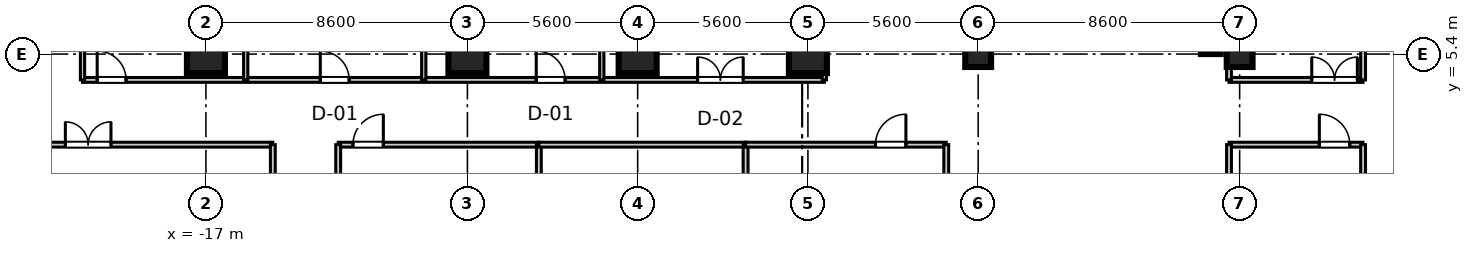
"""IFC4 building model, lengths in metres.
Left out: names, types, materials, properties, quantities, classifications, styles, units other than length and angle.
Written with IfcOpenShell. Run it as: python <this file> out.ifc"""

import sys

from ifc_helpers import new_model, si_unit, direction, frame, frame_2d, origin, origin_2d, place, context, subcontext, project, spatial, rectangle, extrude, source, transform, mapped, element, fill, save


model = new_model("IFC4")
c1 = context("Model", 3, precision=1e-05, world=origin(), true_north=direction((0.0, 1.0)))
c2 = subcontext(c1, "Body", "Model", "MODEL_VIEW")
j1 = project(units=[si_unit("LENGTHUNIT", "METRE"), si_unit("PLANEANGLEUNIT", "RADIAN")], contexts=[c1])
p1 = place(None, origin())
s1 = spatial("IfcSite", under=j1, at=p1, CompositionType="ELEMENT")
p2 = place(p1, origin())
s2 = spatial("IfcBuilding", under=s1, at=p2, CompositionType="ELEMENT")
p3 = place(p2, frame((0.0, 0.0, 88.3)))
s3 = spatial("IfcBuildingStorey", under=s2, at=p3, CompositionType="ELEMENT", Elevation=88.3)
m1 = source(origin(), c2, "Body", "SweptSolid", [
    extrude(rectangle(XDim=1.25, YDim=1.25, at=origin_2d()), origin(), (0.0, 0.0, 1.0), 3.605),
])
for number, where, z_axis, x_axis in (
    (1, (-17.0, 5.4, 0.0), (0.0, 0.0, 1.0), (1.0, 0.0, 0.0)),
    (2, (-8.4, 5.4, 0.0), (0.0, 0.0, 1.0), (1.0, 0.0, 0.0)),
    (3, (-2.8, 5.4, 0.0), (0.0, 0.0, 1.0), (1.0, 0.0, 0.0)),
    (4, (2.8, 5.4, 0.0), (0.0, 0.0, 1.0), (1.0, 0.0, 0.0)),
):
    element("IfcColumn", number, at=place(p3, frame(where, z_axis=z_axis, x_axis=x_axis)), inside=s3, PredefinedType="COLUMN", context=c2, shape_type="MappedRepresentation", body=[
        mapped(m1, transform((0.0, 0.0, 0.0), scale=1.0)),
    ])
m2 = source(origin(), c2, "Body", "SweptSolid", [
    extrude(rectangle(XDim=0.85, YDim=0.85, at=origin_2d()), origin(), (0.0, 0.0, 1.0), 3.605),
])
for number, where, z_axis, x_axis in (
    (5, (8.4, 5.4, 0.0), (0.0, 0.0, 1.0), (1.0, 0.0, 0.0)),
    (6, (17.0, 5.4, 0.0), (0.0, 0.0, 1.0), (1.0, 0.0, 0.0)),
):
    element("IfcColumn", number, at=place(p3, frame(where, z_axis=z_axis, x_axis=x_axis)), inside=s3, PredefinedType="PILASTER", context=c2, shape_type="MappedRepresentation", body=[
        mapped(m2, transform((0.0, 0.0, 0.0), scale=1.0)),
    ])
m3 = source(origin(), c2, "Body", "SweptSolid", [
    extrude(rectangle(XDim=11.6, YDim=0.65, at=frame_2d((5.8, 0.0))), origin(), (0.0, 0.0, 1.0), 3.38),
])
p4 = place(p3, frame((16.05, 5.4, 0.0), z_axis=(0.0, 0.0, 1.0), x_axis=(0.0, 1.0, 0.0)))
e7 = element("IfcWall", 7, at=p4, inside=s3, PredefinedType="SHEAR", context=c2, shape_type="MappedRepresentation", body=[
    mapped(m3, transform((0.0, 0.0, 0.0), scale=1.0)),
])
m4 = source(origin(), c2, "Body", "SweptSolid", [
    extrude(rectangle(XDim=4.41, YDim=0.16, at=frame_2d((2.205, 0.0))), origin(), (0.0, 0.0, 1.0), 2.72),
])
p5 = place(p3, frame((16.65, 4.55, 0.0), z_axis=(0.0, 0.0, 1.0), x_axis=(1.0, 0.0, 0.0)))
e8 = element("IfcWall", 8, at=p5, inside=s3, PredefinedType="PARTITIONING", context=c2, shape_type="MappedRepresentation", body=[
    mapped(m4, transform((0.0, 0.0, 0.0), scale=1.0)),
])
p6 = place(p5, frame((2.722, 0.0, 0.0)))
e9 = element("IfcOpeningElement", 9, at=p6, cuts=e8, PredefinedType="OPENING", context=c2, shape_type="SweptSolid", body=[
    extrude(rectangle(XDim=1.5, YDim=2.15, at=frame_2d((0.75, 1.075))), frame((0.0, 0.09, 0.0), z_axis=(0.0, -1.0, 0.0), x_axis=(1.0, 0.0, 0.0)), (0.0, 0.0, 1.0), 0.18),
])
m5 = source(origin(), c2, "Body", "SweptSolid", [
    extrude(rectangle(XDim=19.25, YDim=0.16, at=frame_2d((9.625, 0.0))), origin(), (0.0, 0.0, 1.0), 2.72),
])
p7 = place(p3, frame((16.65, 4.55, 0.0), z_axis=(0.0, 0.0, 1.0), x_axis=(0.0, 1.0, 0.0)))
e10 = element("IfcWall", 10, at=p7, inside=s3, PredefinedType="PARTITIONING", context=c2, shape_type="MappedRepresentation", body=[
    mapped(m5, transform((0.0, 0.0, 0.0), scale=1.0)),
])
m6 = source(origin(), c2, "Body", "SweptSolid", [
    extrude(rectangle(XDim=17.83, YDim=0.16, at=frame_2d((8.915, 0.0))), origin(), (0.0, 0.0, 1.0), 2.72),
])
p8 = place(p3, frame((21.06, 4.55, 0.0), z_axis=(0.0, 0.0, 1.0), x_axis=(0.0, 1.0, 0.0)))
e11 = element("IfcWall", 11, at=p8, inside=s3, PredefinedType="PARTITIONING", context=c2, shape_type="MappedRepresentation", body=[
    mapped(m6, transform((0.0, 0.0, 0.0), scale=1.0)),
])
m7 = source(origin(), c2, "Body", "SweptSolid", [
    extrude(rectangle(XDim=24.4, YDim=0.16, at=frame_2d((12.2, 0.0))), origin(), (0.0, 0.0, 1.0), 2.72),
])
p9 = place(p3, frame((-21.06, 4.55, 0.0), z_axis=(0.0, 0.0, 1.0), x_axis=(1.0, 0.0, 0.0)))
e12 = element("IfcWall", 12, at=p9, inside=s3, PredefinedType="PARTITIONING", context=c2, shape_type="MappedRepresentation", body=[
    mapped(m7, transform((0.0, 0.0, 0.0), scale=1.0)),
])
p10 = place(p9, frame((0.483, 0.0, 0.0)))
e13 = element("IfcOpeningElement", 13, at=p10, cuts=e12, PredefinedType="OPENING", context=c2, shape_type="SweptSolid", body=[
    extrude(rectangle(XDim=0.95, YDim=2.1, at=frame_2d((0.475, 1.05))), frame((0.0, 0.09, 0.0), z_axis=(0.0, -1.0, 0.0), x_axis=(1.0, 0.0, 0.0)), (0.0, 0.0, 1.0), 0.18),
])
p11 = place(p9, frame((7.821, 0.0, 0.0)))
e14 = element("IfcOpeningElement", 14, at=p11, cuts=e12, PredefinedType="OPENING", context=c2, shape_type="SweptSolid", body=[
    extrude(rectangle(XDim=0.95, YDim=2.1, at=frame_2d((0.475, 1.05))), frame((0.0, 0.09, 0.0), z_axis=(0.0, -1.0, 0.0), x_axis=(1.0, 0.0, 0.0)), (0.0, 0.0, 1.0), 0.18),
])
p12 = place(p9, frame((14.924, 0.0, 0.0)))
e15 = element("IfcOpeningElement", 15, at=p12, cuts=e12, PredefinedType="OPENING", context=c2, shape_type="SweptSolid", body=[
    extrude(rectangle(XDim=0.95, YDim=2.1, at=frame_2d((0.475, 1.05))), frame((0.0, 0.09, 0.0), z_axis=(0.0, -1.0, 0.0), x_axis=(1.0, 0.0, 0.0)), (0.0, 0.0, 1.0), 0.18),
])
p13 = place(p9, frame((20.232, 0.0, 0.0)))
e16 = element("IfcOpeningElement", 16, at=p13, cuts=e12, PredefinedType="OPENING", context=c2, shape_type="SweptSolid", body=[
    extrude(rectangle(XDim=1.5, YDim=2.15, at=frame_2d((0.75, 1.075))), frame((0.0, 0.09, 0.0), z_axis=(0.0, -1.0, 0.0), x_axis=(1.0, 0.0, 0.0)), (0.0, 0.0, 1.0), 0.18),
])
m8 = source(origin(), c2, "Body", "SweptSolid", [
    extrude(rectangle(XDim=17.83, YDim=0.14, at=frame_2d((8.915, 0.0))), origin(), (0.0, 0.0, 1.0), 2.72),
])
p14 = place(p3, frame((-21.06, 4.55, 0.0), z_axis=(0.0, 0.0, 1.0), x_axis=(0.0, 1.0, 0.0)))
e17 = element("IfcWall", 17, at=p14, inside=s3, PredefinedType="PARTITIONING", context=c2, shape_type="MappedRepresentation", body=[
    mapped(m8, transform((0.0, 0.0, 0.0), scale=1.0)),
])
m9 = source(origin(), c2, "Body", "SweptSolid", [
    extrude(rectangle(XDim=19.25, YDim=0.14, at=frame_2d((9.625, 0.0))), origin(), (0.0, 0.0, 1.0), 2.72),
])
for number, where, z_axis, x_axis in (
    (18, (3.34, 4.55, 0.0), (0.0, 0.0, 1.0), (0.0, 1.0, 0.0)),
    (19, (-15.692, 4.55, 0.0), (0.0, 0.0, 1.0), (0.0, 1.0, 0.0)),
    (20, (-9.836, 4.55, 0.0), (0.0, 0.0, 1.0), (0.0, 1.0, 0.0)),
    (21, (-3.98, 4.55, 0.0), (0.0, 0.0, 1.0), (0.0, 1.0, 0.0)),
):
    element("IfcWall", number, at=place(p3, frame(where, z_axis=z_axis, x_axis=x_axis)), inside=s3, PredefinedType="PARTITIONING", context=c2, shape_type="MappedRepresentation", body=[
        mapped(m9, transform((0.0, 0.0, 0.0), scale=1.0)),
    ])
m10 = source(origin(), c2, "Body", "SweptSolid", [
    extrude(rectangle(XDim=9.0, YDim=0.16, at=frame_2d((4.5, 0.0))), origin(), (0.0, 0.0, 1.0), 2.72),
])
p15 = place(p3, frame((-23.8, 2.42, 0.0), z_axis=(0.0, 0.0, 1.0), x_axis=(1.0, 0.0, 0.0)))
e22 = element("IfcWall", 22, at=p15, inside=s3, PredefinedType="PARTITIONING", context=c2, shape_type="MappedRepresentation", body=[
    mapped(m10, transform((0.0, 0.0, 0.0), scale=1.0)),
])
p16 = place(p15, frame((2.176, 0.0, 0.0)))
e23 = element("IfcOpeningElement", 23, at=p16, cuts=e22, PredefinedType="OPENING", context=c2, shape_type="SweptSolid", body=[
    extrude(rectangle(XDim=1.5, YDim=2.15, at=frame_2d((0.75, 1.075))), frame((0.0, 0.09, 0.0), z_axis=(0.0, -1.0, 0.0), x_axis=(1.0, 0.0, 0.0)), (0.0, 0.0, 1.0), 0.18),
])
m11 = source(origin(), c2, "Body", "SweptSolid", [
    extrude(rectangle(XDim=4.84, YDim=0.16, at=frame_2d((2.42, 0.0))), origin(), (0.0, 0.0, 1.0), 2.72),
])
p17 = place(p3, frame((-14.8, -2.42, 0.0), z_axis=(0.0, 0.0, 1.0), x_axis=(0.0, 1.0, 0.0)))
e24 = element("IfcWall", 24, at=p17, inside=s3, PredefinedType="PARTITIONING", context=c2, shape_type="MappedRepresentation", body=[
    mapped(m11, transform((0.0, 0.0, 0.0), scale=1.0)),
])
m12 = source(origin(), c2, "Body", "SweptSolid", [
    extrude(rectangle(XDim=6.6, YDim=0.16, at=frame_2d((3.3, 0.0))), origin(), (0.0, 0.0, 1.0), 2.72),
])
p18 = place(p3, frame((-12.65, 2.42, 0.0), z_axis=(0.0, 0.0, 1.0), x_axis=(1.0, 0.0, 0.0)))
e25 = element("IfcWall", 25, at=p18, inside=s3, PredefinedType="PARTITIONING", context=c2, shape_type="MappedRepresentation", body=[
    mapped(m12, transform((0.0, 0.0, 0.0), scale=1.0)),
])
p19 = place(p18, frame((0.485, 0.0, 0.0)))
e26 = element("IfcOpeningElement", 26, at=p19, cuts=e25, PredefinedType="OPENING", context=c2, shape_type="SweptSolid", body=[
    extrude(rectangle(XDim=1.0, YDim=2.1, at=frame_2d((0.5, 1.05))), frame((0.0, 0.09, 0.0), z_axis=(0.0, -1.0, 0.0), x_axis=(1.0, 0.0, 0.0)), (0.0, 0.0, 1.0), 0.18),
])
for number, where, z_axis, x_axis in (
    (27, (-12.65, -2.42, 0.0), (0.0, 0.0, 1.0), (0.0, 1.0, 0.0)),
    (28, (-6.05, -2.42, 0.0), (0.0, 0.0, 1.0), (0.0, 1.0, 0.0)),
):
    element("IfcWall", number, at=place(p3, frame(where, z_axis=z_axis, x_axis=x_axis)), inside=s3, PredefinedType="PARTITIONING", context=c2, shape_type="MappedRepresentation", body=[
        mapped(m11, transform((0.0, 0.0, 0.0), scale=1.0)),
    ])
m13 = source(origin(), c2, "Body", "SweptSolid", [
    extrude(rectangle(XDim=6.8, YDim=0.16, at=frame_2d((3.4, 0.0))), origin(), (0.0, 0.0, 1.0), 2.72),
])
p20 = place(p3, frame((-6.05, 2.42, 0.0), z_axis=(0.0, 0.0, 1.0), x_axis=(1.0, 0.0, 0.0)))
e29 = element("IfcWall", 29, at=p20, inside=s3, PredefinedType="PARTITIONING", context=c2, shape_type="MappedRepresentation", body=[
    mapped(m13, transform((0.0, 0.0, 0.0), scale=1.0)),
])
p21 = place(p3, frame((0.75, -2.42, 0.0), z_axis=(0.0, 0.0, 1.0), x_axis=(0.0, 1.0, 0.0)))
e30 = element("IfcWall", 30, at=p21, inside=s3, PredefinedType="PARTITIONING", context=c2, shape_type="MappedRepresentation", body=[
    mapped(m11, transform((0.0, 0.0, 0.0), scale=1.0)),
])
m14 = source(origin(), c2, "Body", "SweptSolid", [
    extrude(rectangle(XDim=6.6, YDim=0.16, at=frame_2d((3.3, 0.0))), origin(), (0.0, 0.0, 1.0), 2.72),
])
p22 = place(p3, frame((0.75, 2.42, 0.0), z_axis=(0.0, 0.0, 1.0), x_axis=(1.0, 0.0, 0.0)))
e31 = element("IfcWall", 31, at=p22, inside=s3, PredefinedType="PARTITIONING", context=c2, shape_type="MappedRepresentation", body=[
    mapped(m14, transform((0.0, 0.0, 0.0), scale=1.0)),
])
p23 = place(p22, frame((4.273, 0.0, 0.0)))
e32 = element("IfcOpeningElement", 32, at=p23, cuts=e31, PredefinedType="OPENING", context=c2, shape_type="SweptSolid", body=[
    extrude(rectangle(XDim=1.0, YDim=2.1, at=frame_2d((0.5, 1.05))), frame((0.0, 0.09, 0.0), z_axis=(0.0, -1.0, 0.0), x_axis=(1.0, 0.0, 0.0)), (0.0, 0.0, 1.0), 0.18),
])
p24 = place(p3, frame((7.35, -2.42, 0.0), z_axis=(0.0, 0.0, 1.0), x_axis=(0.0, 1.0, 0.0)))
e33 = element("IfcWall", 33, at=p24, inside=s3, PredefinedType="PARTITIONING", context=c2, shape_type="MappedRepresentation", body=[
    mapped(m11, transform((0.0, 0.0, 0.0), scale=1.0)),
])
p25 = place(p3, frame((16.65, 2.42, 0.0), z_axis=(0.0, 0.0, 1.0), x_axis=(1.0, 0.0, 0.0)))
e34 = element("IfcWall", 34, at=p25, inside=s3, PredefinedType="PARTITIONING", context=c2, shape_type="MappedRepresentation", body=[
    mapped(m4, transform((0.0, 0.0, 0.0), scale=1.0)),
])
p26 = place(p25, frame((2.972, 0.0, 0.0)))
e35 = element("IfcOpeningElement", 35, at=p26, cuts=e34, PredefinedType="OPENING", context=c2, shape_type="SweptSolid", body=[
    extrude(rectangle(XDim=1.0, YDim=2.1, at=frame_2d((0.5, 1.05))), frame((0.0, 0.09, 0.0), z_axis=(0.0, -1.0, 0.0), x_axis=(1.0, 0.0, 0.0)), (0.0, 0.0, 1.0), 0.18),
])
for number, where, z_axis, x_axis in (
    (36, (16.65, -2.42, 0.0), (0.0, 0.0, 1.0), (0.0, 1.0, 0.0)),
    (37, (21.06, -2.42, 0.0), (0.0, 0.0, 1.0), (0.0, 1.0, 0.0)),
):
    element("IfcWall", number, at=place(p3, frame(where, z_axis=z_axis, x_axis=x_axis)), inside=s3, PredefinedType="PARTITIONING", context=c2, shape_type="MappedRepresentation", body=[
        mapped(m11, transform((0.0, 0.0, 0.0), scale=1.0)),
    ])
m15 = source(origin(), c2, "Body", "SweptSolid", [
    extrude(rectangle(XDim=1.5, YDim=2.15, at=frame_2d((0.75, 1.075))), frame((0.0, 0.025, 0.0), z_axis=(0.0, -1.0, 0.0), x_axis=(1.0, 0.0, 0.0)), (0.0, 0.0, 1.0), 0.05),
])
p27 = place(p6, origin())
e38 = element("IfcDoor", 38, at=p27, inside=s3, OperationType="DOUBLE_DOOR_SINGLE_SWING", PredefinedType="DOOR", context=c2, shape_type="MappedRepresentation", body=[
    mapped(m15, transform((0.0, 0.0, 0.0), scale=1.0)),
])
fill(e9, e38)
m16 = source(origin(), c2, "Body", "SweptSolid", [
    extrude(rectangle(XDim=0.95, YDim=2.1, at=frame_2d((0.475, 1.05))), frame((0.0, 0.025, 0.0), z_axis=(0.0, -1.0, 0.0), x_axis=(1.0, 0.0, 0.0)), (0.0, 0.0, 1.0), 0.05),
])
p28 = place(p10, origin())
e39 = element("IfcDoor", 39, at=p28, inside=s3, OperationType="SINGLE_SWING_LEFT", PredefinedType="DOOR", context=c2, shape_type="MappedRepresentation", body=[
    mapped(m16, transform((0.0, 0.0, 0.0), scale=1.0)),
])
fill(e13, e39)
p29 = place(p11, origin())
e40 = element("IfcDoor", 40, at=p29, inside=s3, OperationType="SINGLE_SWING_LEFT", PredefinedType="DOOR", context=c2, shape_type="MappedRepresentation", body=[
    mapped(m16, transform((0.0, 0.0, 0.0), scale=1.0)),
])
fill(e14, e40)
p30 = place(p12, origin())
e41 = element("IfcDoor", 41, at=p30, inside=s3, OperationType="SINGLE_SWING_LEFT", PredefinedType="DOOR", context=c2, shape_type="MappedRepresentation", body=[
    mapped(m16, transform((0.0, 0.0, 0.0), scale=1.0)),
])
fill(e15, e41)
p31 = place(p13, origin())
e42 = element("IfcDoor", 42, at=p31, inside=s3, OperationType="DOUBLE_DOOR_SINGLE_SWING", PredefinedType="DOOR", context=c2, shape_type="MappedRepresentation", body=[
    mapped(m15, transform((0.0, 0.0, 0.0), scale=1.0)),
])
fill(e16, e42)
p32 = place(p16, origin())
e43 = element("IfcDoor", 43, at=p32, inside=s3, OperationType="DOUBLE_DOOR_SINGLE_SWING", PredefinedType="DOOR", context=c2, shape_type="MappedRepresentation", body=[
    mapped(m15, transform((0.0, 0.0, 0.0), scale=1.0)),
])
fill(e23, e43)
m17 = source(origin(), c2, "Body", "SweptSolid", [
    extrude(rectangle(XDim=1.0, YDim=2.1, at=frame_2d((0.5, 1.05))), frame((0.0, 0.025, 0.0), z_axis=(0.0, -1.0, 0.0), x_axis=(1.0, 0.0, 0.0)), (0.0, 0.0, 1.0), 0.05),
])
p33 = place(p19, frame((1.0, 0.0, 0.0), z_axis=(0.0, 0.0, 1.0), x_axis=(-1.0, 0.0, 0.0)))
e44 = element("IfcDoor", 44, at=p33, inside=s3, OperationType="SINGLE_SWING_RIGHT", PredefinedType="DOOR", context=c2, shape_type="MappedRepresentation", body=[
    mapped(m17, transform((0.0, 0.0, 0.0), scale=1.0)),
])
fill(e26, e44)
p34 = place(p23, frame((1.0, 0.0, 0.0), z_axis=(0.0, 0.0, 1.0), x_axis=(-1.0, 0.0, 0.0)))
e45 = element("IfcDoor", 45, at=p34, inside=s3, OperationType="SINGLE_SWING_RIGHT", PredefinedType="DOOR", context=c2, shape_type="MappedRepresentation", body=[
    mapped(m17, transform((0.0, 0.0, 0.0), scale=1.0)),
])
fill(e32, e45)
p35 = place(p26, frame((1.0, 0.0, 0.0), z_axis=(0.0, 0.0, 1.0), x_axis=(-1.0, 0.0, 0.0)))
e46 = element("IfcDoor", 46, at=p35, inside=s3, OperationType="SINGLE_SWING_LEFT", PredefinedType="DOOR", context=c2, shape_type="MappedRepresentation", body=[
    mapped(m17, transform((0.0, 0.0, 0.0), scale=1.0)),
])
fill(e35, e46)
save(model, sys.argv[1])
